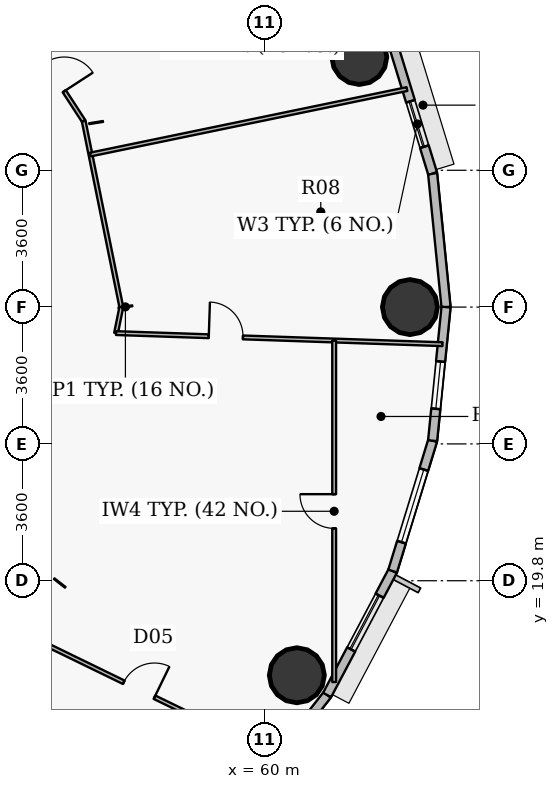
"""IFC4 building model, lengths in metres.
Left out: names, types, materials, properties, quantities, classifications, styles, units other than length and angle.
Written with IfcOpenShell. Run it as: python <this file> out.ifc"""

import sys

from ifc_helpers import new_model, si_unit, direction, frame, frame_2d, origin, origin_2d, place, context, subcontext, project, spatial, rectangle, hollow_circle, extrude, source, transform, mapped, element, fill, save


model = new_model("IFC4")
c1 = context("Model", 3, precision=1e-05, world=origin(), true_north=direction((0.0, 1.0)))
c2 = subcontext(c1, "Body", "Model", "MODEL_VIEW")
j1 = project(units=[si_unit("LENGTHUNIT", "METRE"), si_unit("PLANEANGLEUNIT", "RADIAN")], contexts=[c1])
p1 = place(None, origin())
s1 = spatial("IfcSite", under=j1, at=p1, CompositionType="ELEMENT")
p2 = place(p1, origin())
s2 = spatial("IfcBuilding", under=s1, at=p2, CompositionType="ELEMENT")
p3 = place(p2, frame((0.0, 0.0, 130.95)))
s3 = spatial("IfcBuildingStorey", under=s2, at=p3, CompositionType="ELEMENT", Elevation=130.95)
for number, where, z_axis, x_axis in (
    (1, (63.825, 27.0, 0.0), (0.0, 0.0, 1.0), (1.0, 0.0, 0.0)),
    (2, (62.493, 33.581, 0.0), (0.0, 0.0, 1.0), (1.0, 0.0, 0.0)),
    (3, (60.849, 17.312, 0.0), (0.0, 0.0, 1.0), (1.0, 0.0, 0.0)),
):
    element("IfcColumn", number, at=place(p3, frame(where, z_axis=z_axis, x_axis=x_axis)), inside=s3, PredefinedType="COLUMN", context=c2, shape_type="SweptSolid", body=[
        extrude(hollow_circle(Radius=0.725, WallThickness=0.042, at=origin_2d()), origin(), (0.0, 0.0, 1.0), 3.75),
    ])
p4 = place(p3, frame((64.422, 30.515, 0.0), z_axis=(0.0, 0.0, 1.0), x_axis=(0.099989468229, -0.994988495533, 0.0)))
e4 = element("IfcWall", 4, at=p4, inside=s3, PredefinedType="SOLIDWALL", context=c2, shape_type="SweptSolid", body=[
    extrude(rectangle(XDim=3.533, YDim=0.24, at=frame_2d((1.767, 0.0))), origin(), (0.0, 0.0, 1.0), 3.5),
])
p5 = place(p3, frame((63.37, 33.945, 0.0), z_axis=(0.0, 0.0, 1.0), x_axis=(0.293124431344, -0.956074300329, 0.0)))
e5 = element("IfcWall", 5, at=p5, inside=s3, PredefinedType="SOLIDWALL", context=c2, shape_type="SweptSolid", body=[
    extrude(rectangle(XDim=3.587, YDim=0.24, at=frame_2d((1.793, 0.0))), origin(), (0.0, 0.0, 1.0), 3.5),
])
p6 = place(p5, frame((1.599, 0.0, 0.9)))
e6 = element("IfcOpeningElement", 6, at=p6, cuts=e5, PredefinedType="OPENING", context=c2, shape_type="SweptSolid", body=[
    extrude(rectangle(XDim=1.25, YDim=1.65, at=origin_2d()), frame((0.625, 0.13, 0.825), z_axis=(0.0, -1.0, 0.0), x_axis=(1.0, 0.0, 0.0)), (0.0, 0.0, 1.0), 0.26),
])
p7 = place(p3, frame((61.645, 16.794, 0.0), z_axis=(0.0, 0.0, 1.0), x_axis=(-0.616272103517, -0.787533297345, 0.0)))
e7 = element("IfcWall", 7, at=p7, inside=s3, PredefinedType="SOLIDWALL", context=c2, shape_type="SweptSolid", body=[
    extrude(rectangle(XDim=3.823, YDim=0.24, at=frame_2d((1.912, 0.0))), origin(), (0.0, 0.0, 1.0), 3.5),
])
p8 = place(p7, frame((0.674, 0.0, 0.9)))
e8 = element("IfcOpeningElement", 8, at=p8, cuts=e7, PredefinedType="OPENING", context=c2, shape_type="SweptSolid", body=[
    extrude(rectangle(XDim=1.25, YDim=1.65, at=origin_2d()), frame((0.625, 0.13, 0.825), z_axis=(0.0, -1.0, 0.0), x_axis=(1.0, 0.0, 0.0)), (0.0, 0.0, 1.0), 0.26),
])
p9 = place(p3, frame((63.37, 20.055, 0.0), z_axis=(0.0, 0.0, 1.0), x_axis=(-0.467614004126, -0.883932770716, 0.0)))
e9 = element("IfcWall", 9, at=p9, inside=s3, PredefinedType="SOLIDWALL", context=c2, shape_type="SweptSolid", body=[
    extrude(rectangle(XDim=3.689, YDim=0.24, at=frame_2d((1.844, 0.0))), origin(), (0.0, 0.0, 1.0), 3.5),
])
p10 = place(p9, frame((0.734, 0.0, 0.9)))
e10 = element("IfcOpeningElement", 10, at=p10, cuts=e9, PredefinedType="OPENING", context=c2, shape_type="SweptSolid", body=[
    extrude(rectangle(XDim=1.6, YDim=1.75, at=origin_2d()), frame((0.8, 0.13, 0.875), z_axis=(0.0, -1.0, 0.0), x_axis=(1.0, 0.0, 0.0)), (0.0, 0.0, 1.0), 0.26),
])
p11 = place(p3, frame((64.422, 23.485, 0.0), z_axis=(0.0, 0.0, 1.0), x_axis=(-0.293124431344, -0.956074300329, 0.0)))
e11 = element("IfcWall", 11, at=p11, inside=s3, PredefinedType="SOLIDWALL", context=c2, shape_type="SweptSolid", body=[
    extrude(rectangle(XDim=3.587, YDim=0.24, at=frame_2d((1.793, 0.0))), origin(), (0.0, 0.0, 1.0), 3.5),
])
p12 = place(p11, frame((0.794, 0.0, 0.9)))
e12 = element("IfcOpeningElement", 12, at=p12, cuts=e11, PredefinedType="OPENING", context=c2, shape_type="SweptSolid", body=[
    extrude(rectangle(XDim=2.0, YDim=1.75, at=origin_2d()), frame((1.0, 0.13, 0.875), z_axis=(0.0, -1.0, 0.0), x_axis=(1.0, 0.0, 0.0)), (0.0, 0.0, 1.0), 0.26),
])
p13 = place(p3, frame((64.775, 27.0, 0.0), z_axis=(0.0, 0.0, 1.0), x_axis=(-0.099989468229, -0.994988495533, 0.0)))
e13 = element("IfcWall", 13, at=p13, inside=s3, PredefinedType="SOLIDWALL", context=c2, shape_type="SweptSolid", body=[
    extrude(rectangle(XDim=3.533, YDim=0.24, at=frame_2d((1.767, 0.0))), origin(), (0.0, 0.0, 1.0), 3.5),
])
p14 = place(p13, frame((1.44, 0.0, 0.9)))
e14 = element("IfcOpeningElement", 14, at=p14, cuts=e13, PredefinedType="OPENING", context=c2, shape_type="SweptSolid", body=[
    extrude(rectangle(XDim=1.25, YDim=1.65, at=origin_2d()), frame((0.625, 0.13, 0.825), z_axis=(0.0, -1.0, 0.0), x_axis=(1.0, 0.0, 0.0)), (0.0, 0.0, 1.0), 0.26),
])
p15 = place(p3, frame((48.85, 32.202, 0.0), z_axis=(0.0, 0.0, 1.0), x_axis=(0.92691714139, 0.375266056281, 0.0)))
e15 = element("IfcWall", 15, at=p15, inside=s3, PredefinedType="PARTITIONING", context=c2, shape_type="SweptSolid", body=[
    extrude(rectangle(XDim=13.696, YDim=0.135, at=frame_2d((6.848, 0.0))), origin(), (0.0, 0.0, 1.0), 2.935),
])
p16 = place(p3, frame((50.801, 16.463, 0.0), z_axis=(0.0, 0.0, 1.0), x_axis=(0.814629457612, -0.579981764188, 0.0)))
e16 = element("IfcWall", 16, at=p16, inside=s3, PredefinedType="PARTITIONING", context=c2, shape_type="SweptSolid", body=[
    extrude(rectangle(XDim=7.89, YDim=0.1, at=frame_2d((3.945, 0.0))), origin(), (0.0, 0.0, 1.0), 2.935),
])
p17 = place(p3, frame((52.366, 36.311, 0.0), z_axis=(0.0, 0.0, 1.0), x_axis=(0.545405249109, -0.838172484781, 0.0)))
e17 = element("IfcWall", 17, at=p17, inside=s3, PredefinedType="PARTITIONING", context=c2, shape_type="SweptSolid", body=[
    extrude(rectangle(XDim=5.269, YDim=0.1, at=frame_2d((2.634, 0.0))), origin(), (0.0, 0.0, 1.0), 2.935),
])
p18 = place(p17, frame((3.432, 0.0, 0.0)))
e18 = element("IfcOpeningElement", 18, at=p18, cuts=e17, PredefinedType="OPENING", context=c2, shape_type="SweptSolid", body=[
    extrude(rectangle(XDim=0.9, YDim=2.1, at=origin_2d()), frame((0.45, 0.06, 1.05), z_axis=(0.0, -1.0, 0.0), x_axis=(1.0, 0.0, 0.0)), (0.0, 0.0, 1.0), 0.12),
])
p19 = place(p17, frame((0.838, 0.0, 0.0)))
e19 = element("IfcOpeningElement", 19, at=p19, cuts=e17, PredefinedType="OPENING", context=c2, shape_type="SweptSolid", body=[
    extrude(rectangle(XDim=0.9, YDim=2.1, at=origin_2d()), frame((0.45, 0.06, 1.05), z_axis=(0.0, -1.0, 0.0), x_axis=(1.0, 0.0, 0.0)), (0.0, 0.0, 1.0), 0.12),
])
p20 = place(p3, frame((53.034, 18.714, 0.0), z_axis=(0.0, 0.0, 1.0), x_axis=(0.899250054894, -0.437434953761, 0.0)))
e20 = element("IfcWall", 20, at=p20, inside=s3, PredefinedType="PARTITIONING", context=c2, shape_type="SweptSolid", body=[
    extrude(rectangle(XDim=8.151, YDim=0.1, at=frame_2d((4.076, 0.0))), origin(), (0.0, 0.0, 1.0), 2.935),
])
p21 = place(p20, frame((3.626, 0.0, 0.0)))
e21 = element("IfcOpeningElement", 21, at=p21, cuts=e20, PredefinedType="OPENING", context=c2, shape_type="SweptSolid", body=[
    extrude(rectangle(XDim=0.9, YDim=2.1, at=origin_2d()), frame((0.45, 0.06, 1.05), z_axis=(0.0, -1.0, 0.0), x_axis=(1.0, 0.0, 0.0)), (0.0, 0.0, 1.0), 0.12),
])
p22 = place(p3, frame((55.24, 31.895, 0.0), z_axis=(0.0, 0.0, 1.0), x_axis=(0.198240417912, -0.980153425085, 0.0)))
e22 = element("IfcWall", 22, at=p22, inside=s3, PredefinedType="PARTITIONING", context=c2, shape_type="SweptSolid", body=[
    extrude(rectangle(XDim=4.994, YDim=0.1, at=frame_2d((2.497, 0.0))), origin(), (0.0, 0.0, 1.0), 2.935),
])
p23 = place(p3, frame((55.418, 31.015, 0.0), z_axis=(0.0, 0.0, 1.0), x_axis=(0.979291441198, 0.202455607966, 0.0)))
e23 = element("IfcWall", 23, at=p23, inside=s3, PredefinedType="PARTITIONING", context=c2, shape_type="SweptSolid", body=[
    extrude(rectangle(XDim=8.504, YDim=0.1, at=frame_2d((4.252, 0.0))), origin(), (0.0, 0.0, 1.0), 2.935),
])
p24 = place(p3, frame((56.092, 26.316, 0.0), z_axis=(0.0, 0.0, 1.0), x_axis=(0.198335504954, 0.980134188504, 0.0)))
e24 = element("IfcWall", 24, at=p24, inside=s3, PredefinedType="PARTITIONING", context=c2, shape_type="SweptSolid", body=[
    extrude(rectangle(XDim=0.698, YDim=0.1, at=frame_2d((0.349, 0.0))), origin(), (0.0, 0.0, 1.0), 2.935),
])
p25 = place(p3, frame((56.092, 26.316, 0.0), z_axis=(0.0, 0.0, 1.0), x_axis=(0.999421848377, -0.033999543924, 0.0)))
e25 = element("IfcWall", 25, at=p25, inside=s3, PredefinedType="PARTITIONING", context=c2, shape_type="SweptSolid", body=[
    extrude(rectangle(XDim=8.595, YDim=0.1, at=frame_2d((4.298, 0.0))), origin(), (0.0, 0.0, 1.0), 2.935),
])
p26 = place(p25, frame((2.441, 0.0, 0.0)))
e26 = element("IfcOpeningElement", 26, at=p26, cuts=e25, PredefinedType="OPENING", context=c2, shape_type="SweptSolid", body=[
    extrude(rectangle(XDim=0.9, YDim=2.1, at=origin_2d()), frame((0.45, 0.06, 1.05), z_axis=(0.0, -1.0, 0.0), x_axis=(1.0, 0.0, 0.0)), (0.0, 0.0, 1.0), 0.12),
])
p27 = place(p3, frame((61.831, 17.135, 0.0), z_axis=(0.0, 0.0, 1.0), x_axis=(0.0, 1.0, 0.0)))
e27 = element("IfcWall", 27, at=p27, inside=s3, PredefinedType="PARTITIONING", context=c2, shape_type="SweptSolid", body=[
    extrude(rectangle(XDim=8.986, YDim=0.1, at=frame_2d((4.493, 0.0))), origin(), (0.0, 0.0, 1.0), 2.935),
])
p28 = place(p27, frame((4.043, 0.0, 0.0)))
e28 = element("IfcOpeningElement", 28, at=p28, cuts=e27, PredefinedType="OPENING", context=c2, shape_type="SweptSolid", body=[
    extrude(rectangle(XDim=0.9, YDim=2.1, at=origin_2d()), frame((0.45, 0.06, 1.05), z_axis=(0.0, -1.0, 0.0), x_axis=(1.0, 0.0, 0.0)), (0.0, 0.0, 1.0), 0.12),
])
m1 = source(origin(), c2, "Body", "SweptSolid", [
    extrude(rectangle(XDim=1.25, YDim=1.65, at=origin_2d()), frame((0.625, 0.03, 0.825), z_axis=(0.0, -1.0, 0.0), x_axis=(1.0, 0.0, 0.0)), (0.0, 0.0, 1.0), 0.06),
])
p29 = place(p6, origin())
e29 = element("IfcWindow", 29, at=p29, inside=s3, PartitioningType="SINGLE_PANEL", PredefinedType="WINDOW", context=c2, shape_type="MappedRepresentation", body=[
    mapped(m1, transform((0.0, 0.0, 0.0), x_axis=(1.0, 0.0, 0.0), y_axis=(0.0, 1.0, 0.0), z_axis=(0.0, 0.0, 1.0), scale=1.0)),
])
fill(e6, e29)
m2 = source(origin(), c2, "Body", "SweptSolid", [
    extrude(rectangle(XDim=1.6, YDim=1.75, at=origin_2d()), frame((0.8, 0.03, 0.875), z_axis=(0.0, -1.0, 0.0), x_axis=(1.0, 0.0, 0.0)), (0.0, 0.0, 1.0), 0.06),
])
p30 = place(p10, origin())
e30 = element("IfcWindow", 30, at=p30, inside=s3, PartitioningType="DOUBLE_PANEL_VERTICAL", PredefinedType="WINDOW", context=c2, shape_type="MappedRepresentation", body=[
    mapped(m2, transform((0.0, 0.0, 0.0), x_axis=(1.0, 0.0, 0.0), y_axis=(0.0, 1.0, 0.0), z_axis=(0.0, 0.0, 1.0), scale=1.0)),
])
fill(e10, e30)
m3 = source(origin(), c2, "Body", "SweptSolid", [
    extrude(rectangle(XDim=2.0, YDim=1.75, at=origin_2d()), frame((1.0, 0.03, 0.875), z_axis=(0.0, -1.0, 0.0), x_axis=(1.0, 0.0, 0.0)), (0.0, 0.0, 1.0), 0.06),
])
p31 = place(p12, origin())
e31 = element("IfcWindow", 31, at=p31, inside=s3, PartitioningType="DOUBLE_PANEL_VERTICAL", PredefinedType="WINDOW", context=c2, shape_type="MappedRepresentation", body=[
    mapped(m3, transform((0.0, 0.0, 0.0), x_axis=(1.0, 0.0, 0.0), y_axis=(0.0, 1.0, 0.0), z_axis=(0.0, 0.0, 1.0), scale=1.0)),
])
fill(e12, e31)
p32 = place(p14, origin())
e32 = element("IfcWindow", 32, at=p32, inside=s3, PartitioningType="SINGLE_PANEL", PredefinedType="WINDOW", context=c2, shape_type="MappedRepresentation", body=[
    mapped(m1, transform((0.0, 0.0, 0.0), x_axis=(1.0, 0.0, 0.0), y_axis=(0.0, 1.0, 0.0), z_axis=(0.0, 0.0, 1.0), scale=1.0)),
])
fill(e14, e32)
m4 = source(origin(), c2, "Body", "SweptSolid", [
    extrude(rectangle(XDim=0.9, YDim=2.1, at=origin_2d()), frame((0.45, 0.025, 1.05), z_axis=(0.0, -1.0, 0.0), x_axis=(1.0, 0.0, 0.0)), (0.0, 0.0, 1.0), 0.05),
])
p33 = place(p21, origin())
e33 = element("IfcDoor", 33, at=p33, inside=s3, OperationType="SINGLE_SWING_RIGHT", PredefinedType="DOOR", context=c2, shape_type="MappedRepresentation", body=[
    mapped(m4, transform((0.0, 0.0, 0.0), x_axis=(1.0, 0.0, 0.0), y_axis=(0.0, 1.0, 0.0), z_axis=(0.0, 0.0, 1.0), scale=1.0)),
])
fill(e21, e33)
p34 = place(p26, origin())
e34 = element("IfcDoor", 34, at=p34, inside=s3, OperationType="SINGLE_SWING_LEFT", PredefinedType="DOOR", context=c2, shape_type="MappedRepresentation", body=[
    mapped(m4, transform((0.0, 0.0, 0.0), x_axis=(1.0, 0.0, 0.0), y_axis=(0.0, 1.0, 0.0), z_axis=(0.0, 0.0, 1.0), scale=1.0)),
])
fill(e26, e34)
p35 = place(p18, origin())
e35 = element("IfcDoor", 35, at=p35, inside=s3, OperationType="SINGLE_SWING_RIGHT", PredefinedType="DOOR", context=c2, shape_type="MappedRepresentation", body=[
    mapped(m4, transform((0.0, 0.0, 0.0), x_axis=(1.0, 0.0, 0.0), y_axis=(0.0, 1.0, 0.0), z_axis=(0.0, 0.0, 1.0), scale=1.0)),
])
fill(e18, e35)
p36 = place(p28, origin())
e36 = element("IfcDoor", 36, at=p36, inside=s3, OperationType="SINGLE_SWING_RIGHT", PredefinedType="DOOR", context=c2, shape_type="MappedRepresentation", body=[
    mapped(m4, transform((0.0, 0.0, 0.0), x_axis=(1.0, 0.0, 0.0), y_axis=(0.0, 1.0, 0.0), z_axis=(0.0, 0.0, 1.0), scale=1.0)),
])
fill(e28, e36)
save(model, sys.argv[1])
